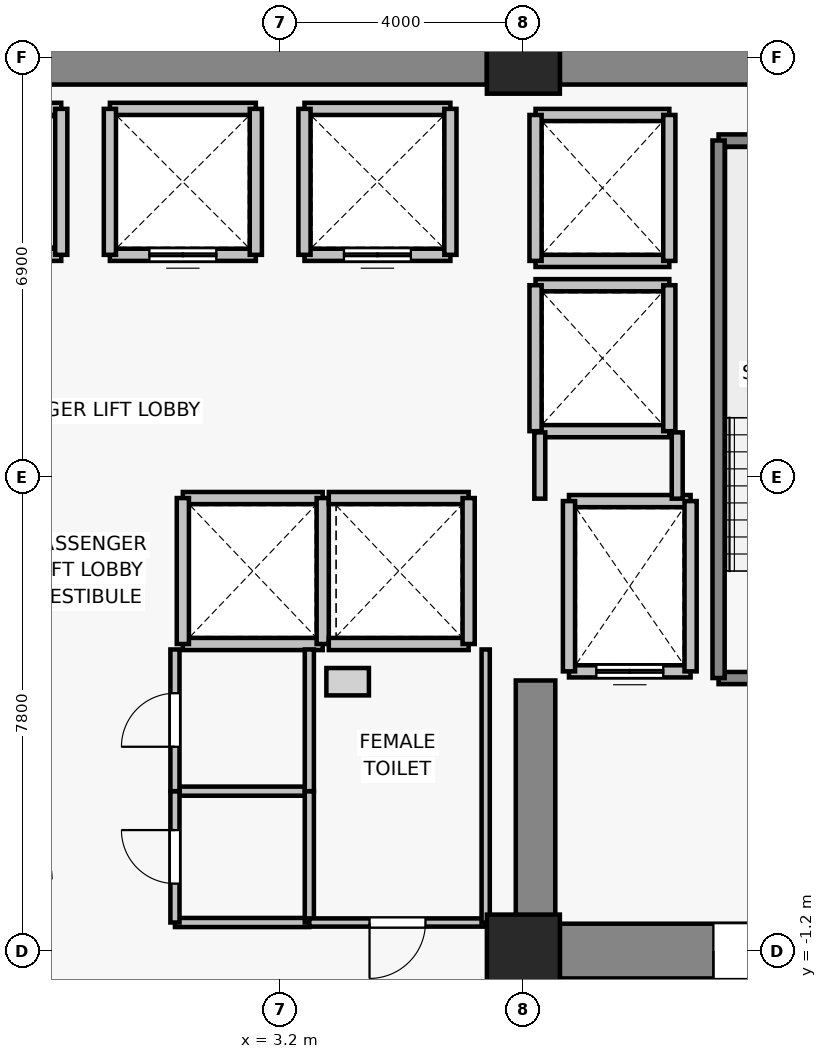
"""IFC4 building model, lengths in metres.
Left out: names, types, materials, properties, quantities, classifications, styles, units other than length and angle.
Written with IfcOpenShell. Run it as: python <this file> out.ifc"""

import sys

from ifc_helpers import new_model, si_unit, direction, frame, frame_2d, origin, origin_2d, place, context, subcontext, project, spatial, rectangle, extrude, source, transform, mapped, element, fill, save


model = new_model("IFC4")
c1 = context("Model", 3, precision=1e-05, world=origin(), true_north=direction((0.0, 1.0)))
c2 = subcontext(c1, "Body", "Model", "MODEL_VIEW")
j1 = project(units=[si_unit("LENGTHUNIT", "METRE"), si_unit("PLANEANGLEUNIT", "RADIAN")], contexts=[c1])
p1 = place(None, origin())
s1 = spatial("IfcSite", under=j1, at=p1, CompositionType="ELEMENT")
p2 = place(p1, origin())
s2 = spatial("IfcBuilding", under=s1, at=p2, CompositionType="ELEMENT")
p3 = place(p2, frame((0.0, 0.0, 43.9)))
s3 = spatial("IfcBuildingStorey", under=s2, at=p3, CompositionType="ELEMENT", Elevation=43.9)
for number, where, z_axis, x_axis in (
    (1, (7.2, -1.2, 0.0), (0.0, 0.0, 1.0), (1.0, 0.0, 0.0)),
    (2, (7.2, 13.5, 0.0), (0.0, 0.0, 1.0), (1.0, 0.0, 0.0)),
):
    element("IfcColumn", number, at=place(p3, frame(where, z_axis=z_axis, x_axis=x_axis)), inside=s3, PredefinedType="COLUMN", context=c2, shape_type="SweptSolid", body=[
        extrude(rectangle(XDim=1.2, YDim=1.2, at=origin_2d()), origin(), (0.0, 0.0, 1.0), 3.3),
    ])
p4 = place(p3, frame((-6.6, 13.5, 0.0), z_axis=(0.0, 0.0, 1.0), x_axis=(1.0, 0.0, 0.0)))
e3 = element("IfcWall", 3, at=p4, inside=s3, PredefinedType="SHEAR", context=c2, shape_type="SweptSolid", body=[
    extrude(rectangle(XDim=13.2, YDim=0.9, at=frame_2d((6.6, 0.0))), origin(), (0.0, 0.0, 1.0), 3.075),
])
p5 = place(p3, frame((7.8, 13.5, 0.0), z_axis=(0.0, 0.0, 1.0), x_axis=(1.0, 0.0, 0.0)))
e4 = element("IfcWall", 4, at=p5, inside=s3, PredefinedType="SHEAR", context=c2, shape_type="SweptSolid", body=[
    extrude(rectangle(XDim=6.0, YDim=0.9, at=frame_2d((3.0, 0.0))), origin(), (0.0, 0.0, 1.0), 3.075),
])
p6 = place(p3, frame((13.8, -1.2, 0.0), z_axis=(0.0, 0.0, 1.0), x_axis=(-1.0, 0.0, 0.0)))
e5 = element("IfcWall", 5, at=p6, inside=s3, PredefinedType="SHEAR", context=c2, shape_type="SweptSolid", body=[
    extrude(rectangle(XDim=6.0, YDim=0.9, at=frame_2d((3.0, 0.0))), origin(), (0.0, 0.0, 1.0), 3.075),
])
p7 = place(p6, frame((2.325, 0.0, 0.0)))
e6 = element("IfcOpeningElement", 6, at=p7, cuts=e5, PredefinedType="OPENING", context=c2, shape_type="SweptSolid", body=[
    extrude(rectangle(XDim=1.15, YDim=2.15, at=frame_2d((0.575, 1.075))), frame((0.0, 0.46, 0.0), z_axis=(0.0, -1.0, 0.0), x_axis=(1.0, 0.0, 0.0)), (0.0, 0.0, 1.0), 0.92),
])
p8 = place(p3, frame((7.4, -0.75, 0.0), z_axis=(0.0, 0.0, 1.0), x_axis=(0.0, 1.0, 0.0)))
e7 = element("IfcWall", 7, at=p8, inside=s3, PredefinedType="SHEAR", context=c2, shape_type="SweptSolid", body=[
    extrude(rectangle(XDim=4.0, YDim=0.65, at=frame_2d((2.0, 0.0))), origin(), (0.0, 0.0, 1.0), 3.075),
])
p9 = place(p3, frame((9.95, 3.4, 0.0), z_axis=(0.0, 0.0, 1.0), x_axis=(-1.0, 0.0, 0.0)))
e8 = element("IfcWall", 8, at=p9, inside=s3, PredefinedType="SOLIDWALL", context=c2, shape_type="SweptSolid", body=[
    extrude(rectangle(XDim=2.0, YDim=0.2, at=frame_2d((1.0, 0.0))), origin(), (0.0, 0.0, 1.0), 3.075),
])
p10 = place(p9, frame((0.45, 0.0, 0.0)))
e9 = element("IfcOpeningElement", 9, at=p10, cuts=e8, PredefinedType="OPENING", context=c2, shape_type="SweptSolid", body=[
    extrude(rectangle(XDim=1.1, YDim=2.2, at=frame_2d((0.55, 1.1))), frame((0.0, 0.11, 0.0), z_axis=(0.0, -1.0, 0.0), x_axis=(1.0, 0.0, 0.0)), (0.0, 0.0, 1.0), 0.22),
])
p11 = place(p3, frame((7.95, 6.2, 0.0), z_axis=(0.0, 0.0, 1.0), x_axis=(1.0, 0.0, 0.0)))
e10 = element("IfcWall", 10, at=p11, inside=s3, PredefinedType="SOLIDWALL", context=c2, shape_type="SweptSolid", body=[
    extrude(rectangle(XDim=2.0, YDim=0.2, at=frame_2d((1.0, 0.0))), origin(), (0.0, 0.0, 1.0), 3.075),
])
for number, where, z_axis, x_axis in (
    (11, (7.95, 3.4, 0.0), (0.0, 0.0, 1.0), (0.0, 1.0, 0.0)),
    (12, (9.95, 6.2, 0.0), (0.0, 0.0, 1.0), (0.0, -1.0, 0.0)),
):
    element("IfcWall", number, at=place(p3, frame(where, z_axis=z_axis, x_axis=x_axis)), inside=s3, PredefinedType="SOLIDWALL", context=c2, shape_type="SweptSolid", body=[
        extrude(rectangle(XDim=2.8, YDim=0.2, at=frame_2d((1.4, 0.0))), origin(), (0.0, 0.0, 1.0), 3.075),
    ])
p12 = place(p3, frame((-0.4, 10.25, 0.0), z_axis=(0.0, 0.0, 1.0), x_axis=(-1.0, 0.0, 0.0)))
e13 = element("IfcWall", 13, at=p12, inside=s3, PredefinedType="SOLIDWALL", context=c2, shape_type="SweptSolid", body=[
    extrude(rectangle(XDim=2.4, YDim=0.2, at=frame_2d((1.2, 0.0))), origin(), (0.0, 0.0, 1.0), 3.075),
])
p13 = place(p12, frame((0.65, 0.0, 0.0)))
e14 = element("IfcOpeningElement", 14, at=p13, cuts=e13, PredefinedType="OPENING", context=c2, shape_type="SweptSolid", body=[
    extrude(rectangle(XDim=1.1, YDim=2.2, at=frame_2d((0.55, 1.1))), frame((0.0, 0.11, 0.0), z_axis=(0.0, -1.0, 0.0), x_axis=(1.0, 0.0, 0.0)), (0.0, 0.0, 1.0), 0.22),
])
p14 = place(p3, frame((-2.8, 12.65, 0.0), z_axis=(0.0, 0.0, 1.0), x_axis=(1.0, 0.0, 0.0)))
e15 = element("IfcWall", 15, at=p14, inside=s3, PredefinedType="SOLIDWALL", context=c2, shape_type="SweptSolid", body=[
    extrude(rectangle(XDim=2.4, YDim=0.2, at=frame_2d((1.2, 0.0))), origin(), (0.0, 0.0, 1.0), 3.075),
])
p15 = place(p3, frame((-0.4, 12.65, 0.0), z_axis=(0.0, 0.0, 1.0), x_axis=(0.0, -1.0, 0.0)))
e16 = element("IfcWall", 16, at=p15, inside=s3, PredefinedType="SOLIDWALL", context=c2, shape_type="SweptSolid", body=[
    extrude(rectangle(XDim=2.4, YDim=0.2, at=frame_2d((1.2, 0.0))), origin(), (0.0, 0.0, 1.0), 3.075),
])
p16 = place(p3, frame((2.8, 10.25, 0.0), z_axis=(0.0, 0.0, 1.0), x_axis=(-1.0, 0.0, 0.0)))
e17 = element("IfcWall", 17, at=p16, inside=s3, PredefinedType="SOLIDWALL", context=c2, shape_type="SweptSolid", body=[
    extrude(rectangle(XDim=2.4, YDim=0.2, at=frame_2d((1.2, 0.0))), origin(), (0.0, 0.0, 1.0), 3.075),
])
p17 = place(p16, frame((0.65, 0.0, 0.0)))
e18 = element("IfcOpeningElement", 18, at=p17, cuts=e17, PredefinedType="OPENING", context=c2, shape_type="SweptSolid", body=[
    extrude(rectangle(XDim=1.1, YDim=2.2, at=frame_2d((0.55, 1.1))), frame((0.0, 0.11, 0.0), z_axis=(0.0, -1.0, 0.0), x_axis=(1.0, 0.0, 0.0)), (0.0, 0.0, 1.0), 0.22),
])
p18 = place(p3, frame((0.4, 12.65, 0.0), z_axis=(0.0, 0.0, 1.0), x_axis=(1.0, 0.0, 0.0)))
e19 = element("IfcWall", 19, at=p18, inside=s3, PredefinedType="SOLIDWALL", context=c2, shape_type="SweptSolid", body=[
    extrude(rectangle(XDim=2.4, YDim=0.2, at=frame_2d((1.2, 0.0))), origin(), (0.0, 0.0, 1.0), 3.075),
])
for number, where, z_axis, x_axis in (
    (20, (0.4, 10.25, 0.0), (0.0, 0.0, 1.0), (0.0, 1.0, 0.0)),
    (21, (2.8, 12.65, 0.0), (0.0, 0.0, 1.0), (0.0, -1.0, 0.0)),
):
    element("IfcWall", number, at=place(p3, frame(where, z_axis=z_axis, x_axis=x_axis)), inside=s3, PredefinedType="SOLIDWALL", context=c2, shape_type="SweptSolid", body=[
        extrude(rectangle(XDim=2.4, YDim=0.2, at=frame_2d((1.2, 0.0))), origin(), (0.0, 0.0, 1.0), 3.075),
    ])
p19 = place(p3, frame((6.0, 10.25, 0.0), z_axis=(0.0, 0.0, 1.0), x_axis=(-1.0, 0.0, 0.0)))
e22 = element("IfcWall", 22, at=p19, inside=s3, PredefinedType="SOLIDWALL", context=c2, shape_type="SweptSolid", body=[
    extrude(rectangle(XDim=2.4, YDim=0.2, at=frame_2d((1.2, 0.0))), origin(), (0.0, 0.0, 1.0), 3.075),
])
p20 = place(p19, frame((0.65, 0.0, 0.0)))
e23 = element("IfcOpeningElement", 23, at=p20, cuts=e22, PredefinedType="OPENING", context=c2, shape_type="SweptSolid", body=[
    extrude(rectangle(XDim=1.1, YDim=2.2, at=frame_2d((0.55, 1.1))), frame((0.0, 0.11, 0.0), z_axis=(0.0, -1.0, 0.0), x_axis=(1.0, 0.0, 0.0)), (0.0, 0.0, 1.0), 0.22),
])
for number, where, z_axis, x_axis in (
    (24, (3.6, 12.65, 0.0), (0.0, 0.0, 1.0), (1.0, 0.0, 0.0)),
    (25, (3.6, 10.25, 0.0), (0.0, 0.0, 1.0), (0.0, 1.0, 0.0)),
    (26, (6.0, 12.65, 0.0), (0.0, 0.0, 1.0), (0.0, -1.0, 0.0)),
):
    element("IfcWall", number, at=place(p3, frame(where, z_axis=z_axis, x_axis=x_axis)), inside=s3, PredefinedType="SOLIDWALL", context=c2, shape_type="SweptSolid", body=[
        extrude(rectangle(XDim=2.4, YDim=0.2, at=frame_2d((1.2, 0.0))), origin(), (0.0, 0.0, 1.0), 3.075),
    ])
for number, where, z_axis, x_axis in (
    (27, (3.9, 3.85, 0.0), (0.0, 0.0, 1.0), (-1.0, 0.0, 0.0)),
    (28, (1.6, 6.25, 0.0), (0.0, 0.0, 1.0), (1.0, 0.0, 0.0)),
):
    element("IfcWall", number, at=place(p3, frame(where, z_axis=z_axis, x_axis=x_axis)), inside=s3, PredefinedType="SOLIDWALL", context=c2, shape_type="SweptSolid", body=[
        extrude(rectangle(XDim=2.3, YDim=0.2, at=frame_2d((1.15, 0.0))), origin(), (0.0, 0.0, 1.0), 3.075),
    ])
for number, where, z_axis, x_axis in (
    (29, (1.6, 3.85, 0.0), (0.0, 0.0, 1.0), (0.0, 1.0, 0.0)),
    (30, (3.9, 6.25, 0.0), (0.0, 0.0, 1.0), (0.0, -1.0, 0.0)),
):
    element("IfcWall", number, at=place(p3, frame(where, z_axis=z_axis, x_axis=x_axis)), inside=s3, PredefinedType="SOLIDWALL", context=c2, shape_type="SweptSolid", body=[
        extrude(rectangle(XDim=2.4, YDim=0.2, at=frame_2d((1.2, 0.0))), origin(), (0.0, 0.0, 1.0), 3.075),
    ])
for number, where, z_axis, x_axis in (
    (31, (6.3, 3.85, 0.0), (0.0, 0.0, 1.0), (-1.0, 0.0, 0.0)),
    (32, (4.0, 6.25, 0.0), (0.0, 0.0, 1.0), (1.0, 0.0, 0.0)),
):
    element("IfcWall", number, at=place(p3, frame(where, z_axis=z_axis, x_axis=x_axis)), inside=s3, PredefinedType="SOLIDWALL", context=c2, shape_type="SweptSolid", body=[
        extrude(rectangle(XDim=2.3, YDim=0.2, at=frame_2d((1.15, 0.0))), origin(), (0.0, 0.0, 1.0), 3.075),
    ])
p21 = place(p3, frame((6.3, 6.25, 0.0), z_axis=(0.0, 0.0, 1.0), x_axis=(0.0, -1.0, 0.0)))
e33 = element("IfcWall", 33, at=p21, inside=s3, PredefinedType="SOLIDWALL", context=c2, shape_type="SweptSolid", body=[
    extrude(rectangle(XDim=2.4, YDim=0.2, at=frame_2d((1.2, 0.0))), origin(), (0.0, 0.0, 1.0), 3.075),
])
for number, where, z_axis, x_axis in (
    (34, (9.6, 7.35, 0.0), (0.0, 0.0, 1.0), (-1.0, 0.0, 0.0)),
    (35, (7.4, 9.75, 0.0), (0.0, 0.0, 1.0), (1.0, 0.0, 0.0)),
):
    element("IfcWall", number, at=place(p3, frame(where, z_axis=z_axis, x_axis=x_axis)), inside=s3, PredefinedType="SOLIDWALL", context=c2, shape_type="SweptSolid", body=[
        extrude(rectangle(XDim=2.2, YDim=0.2, at=frame_2d((1.1, 0.0))), origin(), (0.0, 0.0, 1.0), 2.465),
    ])
p22 = place(p3, frame((7.4, 7.35, 0.0), z_axis=(0.0, 0.0, 1.0), x_axis=(0.0, 1.0, 0.0)))
e36 = element("IfcWall", 36, at=p22, inside=s3, PredefinedType="SOLIDWALL", context=c2, shape_type="SweptSolid", body=[
    extrude(rectangle(XDim=2.4, YDim=0.2, at=frame_2d((1.2, 0.0))), origin(), (0.0, 0.0, 1.0), 2.465),
])
p23 = place(p3, frame((9.6, 9.75, 0.0), z_axis=(0.0, 0.0, 1.0), x_axis=(0.0, -1.0, 0.0)))
e37 = element("IfcWall", 37, at=p23, inside=s3, PredefinedType="SOLIDWALL", context=c2, shape_type="SweptSolid", body=[
    extrude(rectangle(XDim=2.4, YDim=0.2, at=frame_2d((1.2, 0.0))), origin(), (0.0, 0.0, 1.0), 3.075),
])
for number, where, z_axis, x_axis in (
    (38, (9.6, 10.15, 0.0), (0.0, 0.0, 1.0), (-1.0, 0.0, 0.0)),
    (39, (7.4, 12.55, 0.0), (0.0, 0.0, 1.0), (1.0, 0.0, 0.0)),
):
    element("IfcWall", number, at=place(p3, frame(where, z_axis=z_axis, x_axis=x_axis)), inside=s3, PredefinedType="SOLIDWALL", context=c2, shape_type="SweptSolid", body=[
        extrude(rectangle(XDim=2.2, YDim=0.2, at=frame_2d((1.1, 0.0))), origin(), (0.0, 0.0, 1.0), 2.465),
    ])
p24 = place(p3, frame((7.4, 10.15, 0.0), z_axis=(0.0, 0.0, 1.0), x_axis=(0.0, 1.0, 0.0)))
e40 = element("IfcWall", 40, at=p24, inside=s3, PredefinedType="SOLIDWALL", context=c2, shape_type="SweptSolid", body=[
    extrude(rectangle(XDim=2.4, YDim=0.2, at=frame_2d((1.2, 0.0))), origin(), (0.0, 0.0, 1.0), 2.465),
])
p25 = place(p3, frame((9.6, 12.55, 0.0), z_axis=(0.0, 0.0, 1.0), x_axis=(0.0, -1.0, 0.0)))
e41 = element("IfcWall", 41, at=p25, inside=s3, PredefinedType="SOLIDWALL", context=c2, shape_type="SweptSolid", body=[
    extrude(rectangle(XDim=2.4, YDim=0.2, at=frame_2d((1.2, 0.0))), origin(), (0.0, 0.0, 1.0), 3.075),
])
p26 = place(p3, frame((13.93, 3.29, 0.0), z_axis=(0.0, 0.0, 1.0), x_axis=(-1.0, 0.0, 0.0)))
e42 = element("IfcWall", 42, at=p26, inside=s3, PredefinedType="SOLIDWALL", context=c2, shape_type="SweptSolid", body=[
    extrude(rectangle(XDim=3.52, YDim=0.2, at=frame_2d((1.76, 0.0))), origin(), (0.0, 0.0, 1.0), 3.075),
])
p27 = place(p26, frame((1.205, 0.0, 0.0)))
e43 = element("IfcOpeningElement", 43, at=p27, cuts=e42, PredefinedType="OPENING", context=c2, shape_type="SweptSolid", body=[
    extrude(rectangle(XDim=1.15, YDim=2.15, at=frame_2d((0.575, 1.075))), frame((0.0, 0.11, 0.0), z_axis=(0.0, -1.0, 0.0), x_axis=(1.0, 0.0, 0.0)), (0.0, 0.0, 1.0), 0.22),
])
p28 = place(p3, frame((10.41, 12.13, 0.0), z_axis=(0.0, 0.0, 1.0), x_axis=(1.0, 0.0, 0.0)))
e44 = element("IfcWall", 44, at=p28, inside=s3, PredefinedType="SOLIDWALL", context=c2, shape_type="SweptSolid", body=[
    extrude(rectangle(XDim=3.52, YDim=0.2, at=frame_2d((1.76, 0.0))), origin(), (0.0, 0.0, 1.0), 3.075),
])
p29 = place(p3, frame((10.41, 3.29, 0.0), z_axis=(0.0, 0.0, 1.0), x_axis=(0.0, 1.0, 0.0)))
e45 = element("IfcWall", 45, at=p29, inside=s3, PredefinedType="SOLIDWALL", context=c2, shape_type="SweptSolid", body=[
    extrude(rectangle(XDim=8.84, YDim=0.2, at=frame_2d((4.42, 0.0))), origin(), (0.0, 0.0, 1.0), 3.075),
])
p30 = place(p3, frame((7.47, 6.24, 0.0), z_axis=(0.0, 0.0, 1.0), x_axis=(0.0, 1.0, 0.0)))
e46 = element("IfcWall", 46, at=p30, inside=s3, PredefinedType="PARTITIONING", context=c2, shape_type="SweptSolid", body=[
    extrude(rectangle(XDim=1.09, YDim=0.18, at=frame_2d((0.545, 0.0))), origin(), (0.0, 0.0, 1.0), 2.465),
])
p31 = place(p3, frame((9.73, 7.33, 0.0), z_axis=(0.0, 0.0, 1.0), x_axis=(0.0, -1.0, 0.0)))
e47 = element("IfcWall", 47, at=p31, inside=s3, PredefinedType="PARTITIONING", context=c2, shape_type="SweptSolid", body=[
    extrude(rectangle(XDim=1.09, YDim=0.18, at=frame_2d((0.545, 0.0))), origin(), (0.0, 0.0, 1.0), 3.075),
])
for number, where, z_axis, x_axis in (
    (48, (3.68, -0.73, 0.0), (0.0, 0.0, 1.0), (-1.0, 0.0, 0.0)),
    (49, (1.47, 1.43, 0.0), (0.0, 0.0, 1.0), (1.0, 0.0, 0.0)),
):
    element("IfcWall", number, at=place(p3, frame(where, z_axis=z_axis, x_axis=x_axis)), inside=s3, PredefinedType="PARTITIONING", context=c2, shape_type="SweptSolid", body=[
        extrude(rectangle(XDim=2.21, YDim=0.15, at=frame_2d((1.105, 0.0))), origin(), (0.0, 0.0, 1.0), 3.075),
    ])
p32 = place(p3, frame((1.47, -0.73, 0.0), z_axis=(0.0, 0.0, 1.0), x_axis=(0.0, 1.0, 0.0)))
e50 = element("IfcWall", 50, at=p32, inside=s3, PredefinedType="PARTITIONING", context=c2, shape_type="SweptSolid", body=[
    extrude(rectangle(XDim=2.16, YDim=0.15, at=frame_2d((1.08, 0.0))), origin(), (0.0, 0.0, 1.0), 3.075),
])
p33 = place(p32, frame((0.64, 0.0, 0.0)))
e51 = element("IfcOpeningElement", 51, at=p33, cuts=e50, PredefinedType="OPENING", context=c2, shape_type="SweptSolid", body=[
    extrude(rectangle(XDim=0.88, YDim=2.1, at=frame_2d((0.44, 1.05))), frame((0.0, 0.085, 0.0), z_axis=(0.0, -1.0, 0.0), x_axis=(1.0, 0.0, 0.0)), (0.0, 0.0, 1.0), 0.17),
])
p34 = place(p3, frame((3.68, 1.43, 0.0), z_axis=(0.0, 0.0, 1.0), x_axis=(0.0, -1.0, 0.0)))
e52 = element("IfcWall", 52, at=p34, inside=s3, PredefinedType="PARTITIONING", context=c2, shape_type="SweptSolid", body=[
    extrude(rectangle(XDim=2.16, YDim=0.15, at=frame_2d((1.08, 0.0))), origin(), (0.0, 0.0, 1.0), 3.075),
])
p35 = place(p3, frame((1.47, 1.43, 0.0), z_axis=(0.0, 0.0, 1.0), x_axis=(0.0, 1.0, 0.0)))
e53 = element("IfcWall", 53, at=p35, inside=s3, PredefinedType="PARTITIONING", context=c2, shape_type="SweptSolid", body=[
    extrude(rectangle(XDim=2.33, YDim=0.15, at=frame_2d((1.165, 0.0))), origin(), (0.0, 0.0, 1.0), 3.075),
])
p36 = place(p35, frame((0.73, 0.0, 0.0)))
e54 = element("IfcOpeningElement", 54, at=p36, cuts=e53, PredefinedType="OPENING", context=c2, shape_type="SweptSolid", body=[
    extrude(rectangle(XDim=0.88, YDim=2.15, at=frame_2d((0.44, 1.075))), frame((0.0, 0.085, 0.0), z_axis=(0.0, -1.0, 0.0), x_axis=(1.0, 0.0, 0.0)), (0.0, 0.0, 1.0), 0.17),
])
p37 = place(p3, frame((3.68, 3.76, 0.0), z_axis=(0.0, 0.0, 1.0), x_axis=(0.0, -1.0, 0.0)))
e55 = element("IfcWall", 55, at=p37, inside=s3, PredefinedType="PARTITIONING", context=c2, shape_type="SweptSolid", body=[
    extrude(rectangle(XDim=2.33, YDim=0.15, at=frame_2d((1.165, 0.0))), origin(), (0.0, 0.0, 1.0), 3.075),
])
p38 = place(p3, frame((6.58, -0.73, 0.0), z_axis=(0.0, 0.0, 1.0), x_axis=(-1.0, 0.0, 0.0)))
e56 = element("IfcWall", 56, at=p38, inside=s3, PredefinedType="PARTITIONING", context=c2, shape_type="SweptSolid", body=[
    extrude(rectangle(XDim=2.9, YDim=0.135, at=frame_2d((1.45, 0.0))), origin(), (0.0, 0.0, 1.0), 3.075),
])
p39 = place(p38, frame((0.99, 0.0, 0.0)))
e57 = element("IfcOpeningElement", 57, at=p39, cuts=e56, PredefinedType="OPENING", context=c2, shape_type="SweptSolid", body=[
    extrude(rectangle(XDim=0.92, YDim=2.1, at=frame_2d((0.46, 1.05))), frame((0.0, 0.077, 0.0), z_axis=(0.0, -1.0, 0.0), x_axis=(1.0, 0.0, 0.0)), (0.0, 0.0, 1.0), 0.155),
])
p40 = place(p3, frame((6.58, 3.76, 0.0), z_axis=(0.0, 0.0, 1.0), x_axis=(0.0, -1.0, 0.0)))
e58 = element("IfcWall", 58, at=p40, inside=s3, PredefinedType="PARTITIONING", context=c2, shape_type="SweptSolid", body=[
    extrude(rectangle(XDim=4.49, YDim=0.135, at=frame_2d((2.245, 0.0))), origin(), (0.0, 0.0, 1.0), 3.075),
])
m1 = source(origin(), c2, "Body", "SweptSolid", [
    extrude(rectangle(XDim=1.1, YDim=2.2, at=frame_2d((0.55, 1.1))), frame((0.0, 0.025, 0.0), z_axis=(0.0, -1.0, 0.0), x_axis=(1.0, 0.0, 0.0)), (0.0, 0.0, 1.0), 0.05),
])
p41 = place(p10, origin())
e59 = element("IfcDoor", 59, at=p41, inside=s3, OperationType="DOUBLE_DOOR_SLIDING", PredefinedType="DOOR", context=c2, shape_type="MappedRepresentation", body=[
    mapped(m1, transform((0.0, 0.0, 0.0), x_axis=(1.0, 0.0, 0.0), y_axis=(0.0, 1.0, 0.0), z_axis=(0.0, 0.0, 1.0), scale=1.0)),
])
fill(e9, e59)
p42 = place(p17, origin())
e60 = element("IfcDoor", 60, at=p42, inside=s3, OperationType="DOUBLE_DOOR_SLIDING", PredefinedType="DOOR", context=c2, shape_type="MappedRepresentation", body=[
    mapped(m1, transform((0.0, 0.0, 0.0), x_axis=(1.0, 0.0, 0.0), y_axis=(0.0, 1.0, 0.0), z_axis=(0.0, 0.0, 1.0), scale=1.0)),
])
fill(e18, e60)
p43 = place(p20, origin())
e61 = element("IfcDoor", 61, at=p43, inside=s3, OperationType="DOUBLE_DOOR_SLIDING", PredefinedType="DOOR", context=c2, shape_type="MappedRepresentation", body=[
    mapped(m1, transform((0.0, 0.0, 0.0), x_axis=(1.0, 0.0, 0.0), y_axis=(0.0, 1.0, 0.0), z_axis=(0.0, 0.0, 1.0), scale=1.0)),
])
fill(e23, e61)
m2 = source(origin(), c2, "Body", "SweptSolid", [
    extrude(rectangle(XDim=1.15, YDim=2.15, at=frame_2d((0.575, 1.075))), frame((0.0, 0.025, 0.0), z_axis=(0.0, -1.0, 0.0), x_axis=(1.0, 0.0, 0.0)), (0.0, 0.0, 1.0), 0.05),
])
p44 = place(p7, origin())
e62 = element("IfcDoor", 62, at=p44, inside=s3, OperationType="SINGLE_SWING_RIGHT", PredefinedType="DOOR", context=c2, shape_type="MappedRepresentation", body=[
    mapped(m2, transform((0.0, 0.0, 0.0), x_axis=(1.0, 0.0, 0.0), y_axis=(0.0, 1.0, 0.0), z_axis=(0.0, 0.0, 1.0), scale=1.0)),
])
fill(e6, e62)
m3 = source(origin(), c2, "Body", "SweptSolid", [
    extrude(rectangle(XDim=0.88, YDim=2.1, at=frame_2d((0.44, 1.05))), frame((0.0, 0.025, 0.0), z_axis=(0.0, -1.0, 0.0), x_axis=(1.0, 0.0, 0.0)), (0.0, 0.0, 1.0), 0.05),
])
p45 = place(p33, origin())
e63 = element("IfcDoor", 63, at=p45, inside=s3, OperationType="SINGLE_SWING_RIGHT", PredefinedType="DOOR", context=c2, shape_type="MappedRepresentation", body=[
    mapped(m3, transform((0.0, 0.0, 0.0), x_axis=(1.0, 0.0, 0.0), y_axis=(0.0, 1.0, 0.0), z_axis=(0.0, 0.0, 1.0), scale=1.0)),
])
fill(e51, e63)
m4 = source(origin(), c2, "Body", "SweptSolid", [
    extrude(rectangle(XDim=0.88, YDim=2.15, at=frame_2d((0.44, 1.075))), frame((0.0, 0.025, 0.0), z_axis=(0.0, -1.0, 0.0), x_axis=(1.0, 0.0, 0.0)), (0.0, 0.0, 1.0), 0.05),
])
p46 = place(p36, origin())
e64 = element("IfcDoor", 64, at=p46, inside=s3, OperationType="SINGLE_SWING_LEFT", PredefinedType="DOOR", context=c2, shape_type="MappedRepresentation", body=[
    mapped(m4, transform((0.0, 0.0, 0.0), x_axis=(1.0, 0.0, 0.0), y_axis=(0.0, 1.0, 0.0), z_axis=(0.0, 0.0, 1.0), scale=1.0)),
])
fill(e54, e64)
m5 = source(origin(), c2, "Body", "SweptSolid", [
    extrude(rectangle(XDim=0.92, YDim=2.1, at=frame_2d((0.46, 1.05))), frame((0.0, 0.025, 0.0), z_axis=(0.0, -1.0, 0.0), x_axis=(1.0, 0.0, 0.0)), (0.0, 0.0, 1.0), 0.05),
])
p47 = place(p39, origin())
e65 = element("IfcDoor", 65, at=p47, inside=s3, OperationType="SINGLE_SWING_RIGHT", PredefinedType="DOOR", context=c2, shape_type="MappedRepresentation", body=[
    mapped(m5, transform((0.0, 0.0, 0.0), x_axis=(1.0, 0.0, 0.0), y_axis=(0.0, 1.0, 0.0), z_axis=(0.0, 0.0, 1.0), scale=1.0)),
])
fill(e57, e65)
save(model, sys.argv[1])
